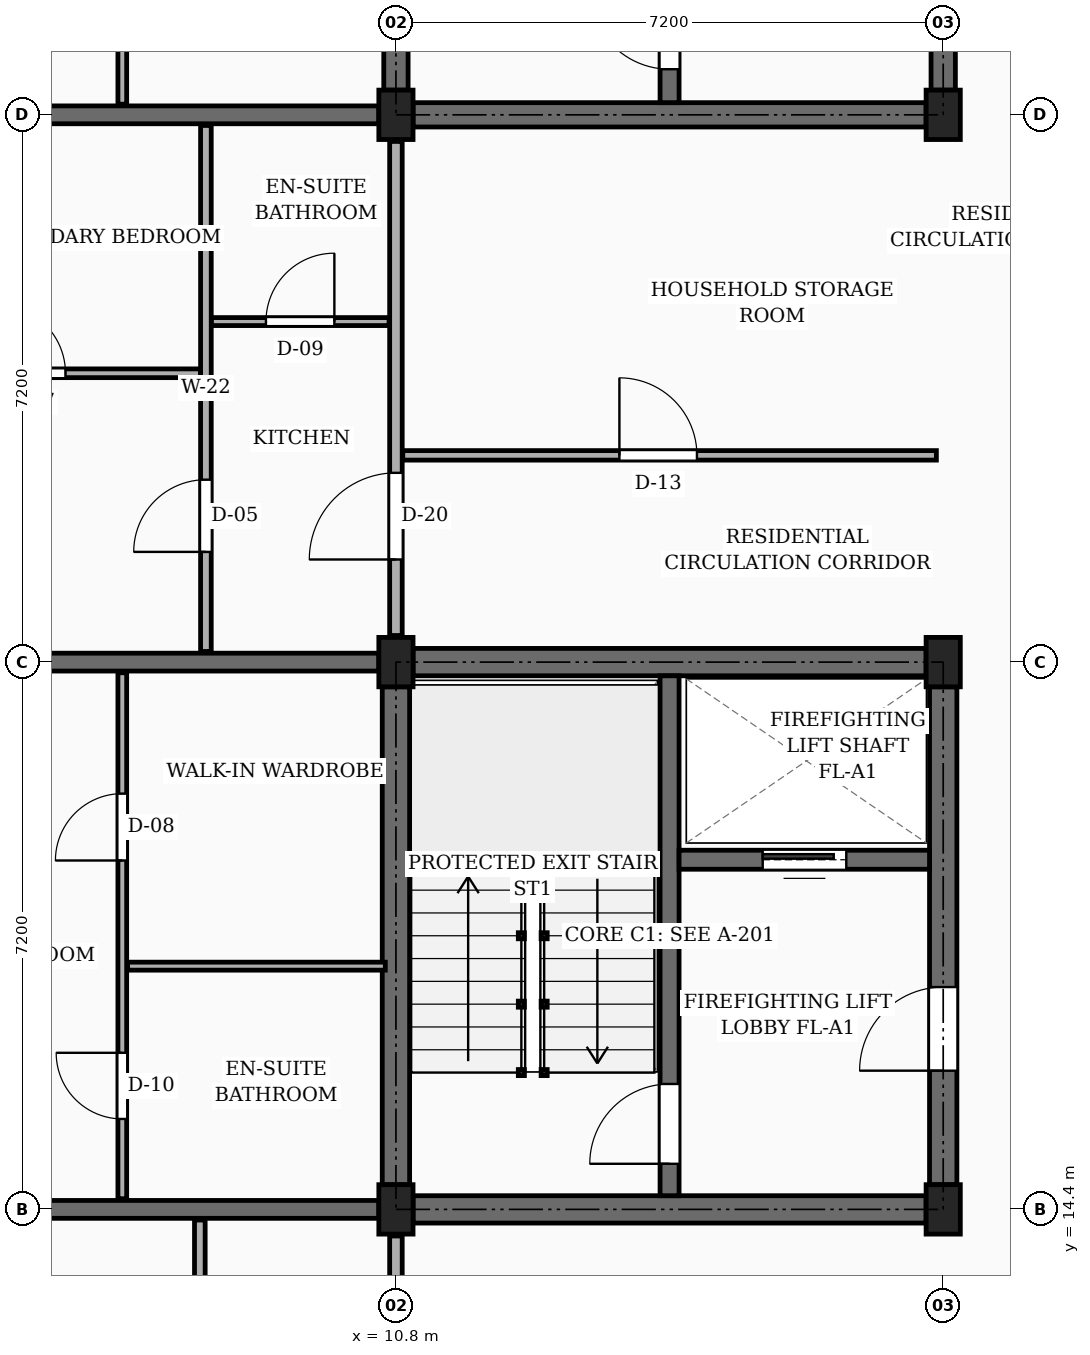
"""IFC4 building model, lengths in metres.
Left out: names, types, materials, properties, quantities, classifications, styles, units other than length and angle.
Written with IfcOpenShell. Run it as: python <this file> out.ifc"""

import sys

from ifc_helpers import new_model, si_unit, direction, frame, frame_2d, origin, origin_2d, place, context, subcontext, project, spatial, rectangle, extrude, element, fill, save


model = new_model("IFC4")
c1 = context("Model", 3, precision=1e-05, world=origin(), true_north=direction((0.0, 1.0)))
c2 = subcontext(c1, "Body", "Model", "MODEL_VIEW")
j1 = project(units=[si_unit("LENGTHUNIT", "METRE"), si_unit("PLANEANGLEUNIT", "RADIAN")], contexts=[c1])
p1 = place(None, origin())
s1 = spatial("IfcSite", under=j1, at=p1, CompositionType="ELEMENT")
p2 = place(p1, origin())
s2 = spatial("IfcBuilding", under=s1, at=p2, CompositionType="ELEMENT")
p3 = place(p2, frame((0.0, 0.0, 20.25)))
s3 = spatial("IfcBuildingStorey", under=s2, at=p3, CompositionType="ELEMENT", Elevation=20.25)
for number, where, z_axis, x_axis in (
    (1, (10.8, 14.4, 0.0), (0.0, 0.0, 1.0), (1.0, 0.0, 0.0)),
    (2, (10.8, 21.6, 0.0), (0.0, 0.0, 1.0), (1.0, 0.0, 0.0)),
    (3, (10.8, 28.8, 0.0), (0.0, 0.0, 1.0), (1.0, 0.0, 0.0)),
    (4, (18.0, 14.4, 0.0), (0.0, 0.0, 1.0), (1.0, 0.0, 0.0)),
    (5, (18.0, 21.6, 0.0), (0.0, 0.0, 1.0), (1.0, 0.0, 0.0)),
    (6, (18.0, 28.8, 0.0), (0.0, 0.0, 1.0), (1.0, 0.0, 0.0)),
):
    element("IfcColumn", number, at=place(p3, frame(where, z_axis=z_axis, x_axis=x_axis)), inside=s3, PredefinedType="COLUMN", context=c2, shape_type="SweptSolid", body=[
        extrude(rectangle(XDim=0.45, YDim=0.65, at=origin_2d()), origin(), (0.0, 0.0, 1.0), 3.15),
    ])
p4 = place(p3, frame((3.875, 14.4, 0.0), z_axis=(0.0, 0.0, 1.0), x_axis=(1.0, 0.0, 0.0)))
e7 = element("IfcWall", 7, at=p4, inside=s3, PredefinedType="SOLIDWALL", context=c2, shape_type="SweptSolid", body=[
    extrude(rectangle(XDim=6.7, YDim=0.235, at=frame_2d((3.35, 0.0))), origin(), (0.0, 0.0, 1.0), 2.17),
])
p5 = place(p4, frame((1.35, 0.0, 0.0)))
e8 = element("IfcOpeningElement", 8, at=p5, cuts=e7, PredefinedType="OPENING", context=c2, shape_type="SweptSolid", body=[
    extrude(rectangle(XDim=0.98, YDim=2.12, at=frame_2d((0.49, 1.06))), frame((0.0, 0.127, 0.0), z_axis=(0.0, -1.0, 0.0), x_axis=(1.0, 0.0, 0.0)), (0.0, 0.0, 1.0), 0.255),
])
p6 = place(p3, frame((3.875, 21.6, 0.0), z_axis=(0.0, 0.0, 1.0), x_axis=(1.0, 0.0, 0.0)))
e9 = element("IfcWall", 9, at=p6, inside=s3, PredefinedType="SOLIDWALL", context=c2, shape_type="SweptSolid", body=[
    extrude(rectangle(XDim=6.7, YDim=0.235, at=frame_2d((3.35, 0.0))), origin(), (0.0, 0.0, 1.0), 2.17),
])
p7 = place(p3, frame((3.875, 28.8, 0.0), z_axis=(0.0, 0.0, 1.0), x_axis=(1.0, 0.0, 0.0)))
e10 = element("IfcWall", 10, at=p7, inside=s3, PredefinedType="SOLIDWALL", context=c2, shape_type="SweptSolid", body=[
    extrude(rectangle(XDim=6.7, YDim=0.235, at=frame_2d((3.35, 0.0))), origin(), (0.0, 0.0, 1.0), 2.17),
])
p8 = place(p7, frame((1.35, 0.0, 0.0)))
e11 = element("IfcOpeningElement", 11, at=p8, cuts=e10, PredefinedType="OPENING", context=c2, shape_type="SweptSolid", body=[
    extrude(rectangle(XDim=0.98, YDim=2.12, at=frame_2d((0.49, 1.06))), frame((0.0, 0.127, 0.0), z_axis=(0.0, -1.0, 0.0), x_axis=(1.0, 0.0, 0.0)), (0.0, 0.0, 1.0), 0.255),
])
p9 = place(p3, frame((10.8, 14.725, 0.0), z_axis=(0.0, 0.0, 1.0), x_axis=(0.0, 1.0, 0.0)))
e12 = element("IfcWall", 12, at=p9, inside=s3, PredefinedType="SHEAR", context=c2, shape_type="SweptSolid", body=[
    extrude(rectangle(XDim=6.55, YDim=0.36, at=frame_2d((3.275, 0.0))), origin(), (0.0, 0.0, 1.0), 2.87),
])
p10 = place(p3, frame((11.025, 21.6, 0.0), z_axis=(0.0, 0.0, 1.0), x_axis=(1.0, 0.0, 0.0)))
e13 = element("IfcWall", 13, at=p10, inside=s3, PredefinedType="SHEAR", context=c2, shape_type="SweptSolid", body=[
    extrude(rectangle(XDim=6.75, YDim=0.36, at=frame_2d((3.375, 0.0))), origin(), (0.0, 0.0, 1.0), 2.87),
])
p11 = place(p3, frame((18.0, 14.725, 0.0), z_axis=(0.0, 0.0, 1.0), x_axis=(0.0, 1.0, 0.0)))
e14 = element("IfcWall", 14, at=p11, inside=s3, PredefinedType="SHEAR", context=c2, shape_type="SweptSolid", body=[
    extrude(rectangle(XDim=6.55, YDim=0.36, at=frame_2d((3.275, 0.0))), origin(), (0.0, 0.0, 1.0), 2.87),
])
p12 = place(p11, frame((1.5, 0.0, 0.0)))
e15 = element("IfcOpeningElement", 15, at=p12, cuts=e14, PredefinedType="OPENING", context=c2, shape_type="SweptSolid", body=[
    extrude(rectangle(XDim=1.1, YDim=2.15, at=frame_2d((0.55, 1.075))), frame((0.0, 0.19, 0.0), z_axis=(0.0, -1.0, 0.0), x_axis=(1.0, 0.0, 0.0)), (0.0, 0.0, 1.0), 0.38),
])
p13 = place(p3, frame((11.025, 14.4, 0.0), z_axis=(0.0, 0.0, 1.0), x_axis=(1.0, 0.0, 0.0)))
e16 = element("IfcWall", 16, at=p13, inside=s3, PredefinedType="SHEAR", context=c2, shape_type="SweptSolid", body=[
    extrude(rectangle(XDim=6.75, YDim=0.36, at=frame_2d((3.375, 0.0))), origin(), (0.0, 0.0, 1.0), 2.87),
])
p14 = place(p3, frame((14.4, 14.58, 0.0), z_axis=(0.0, 0.0, 1.0), x_axis=(0.0, 1.0, 0.0)))
e17 = element("IfcWall", 17, at=p14, inside=s3, PredefinedType="SHEAR", context=c2, shape_type="SweptSolid", body=[
    extrude(rectangle(XDim=6.84, YDim=0.25, at=frame_2d((3.42, 0.0))), origin(), (0.0, 0.0, 1.0), 2.87),
])
p15 = place(p14, frame((0.42, 0.0, 0.0)))
e18 = element("IfcOpeningElement", 18, at=p15, cuts=e17, PredefinedType="OPENING", context=c2, shape_type="SweptSolid", body=[
    extrude(rectangle(XDim=1.05, YDim=2.15, at=frame_2d((0.525, 1.075))), frame((0.0, 0.135, 0.0), z_axis=(0.0, -1.0, 0.0), x_axis=(1.0, 0.0, 0.0)), (0.0, 0.0, 1.0), 0.27),
])
p16 = place(p3, frame((14.525, 19.0, 0.0), z_axis=(0.0, 0.0, 1.0), x_axis=(1.0, 0.0, 0.0)))
e19 = element("IfcWall", 19, at=p16, inside=s3, PredefinedType="SHEAR", context=c2, shape_type="SweptSolid", body=[
    extrude(rectangle(XDim=3.295, YDim=0.25, at=frame_2d((1.647, 0.0))), origin(), (0.0, 0.0, 1.0), 2.87),
])
p17 = place(p16, frame((1.1, 0.0, 0.0)))
e20 = element("IfcOpeningElement", 20, at=p17, cuts=e19, PredefinedType="OPENING", context=c2, shape_type="SweptSolid", body=[
    extrude(rectangle(XDim=1.1, YDim=2.2, at=frame_2d((0.55, 1.1))), frame((0.0, 0.135, 0.0), z_axis=(0.0, -1.0, 0.0), x_axis=(1.0, 0.0, 0.0)), (0.0, 0.0, 1.0), 0.27),
])
p18 = place(p3, frame((10.8, 29.125, 0.0), z_axis=(0.0, 0.0, 1.0), x_axis=(0.0, 1.0, 0.0)))
e21 = element("IfcWall", 21, at=p18, inside=s3, PredefinedType="SHEAR", context=c2, shape_type="SweptSolid", body=[
    extrude(rectangle(XDim=6.55, YDim=0.32, at=frame_2d((3.275, 0.0))), origin(), (0.0, 0.0, 1.0), 2.87),
])
p19 = place(p3, frame((18.0, 29.125, 0.0), z_axis=(0.0, 0.0, 1.0), x_axis=(0.0, 1.0, 0.0)))
e22 = element("IfcWall", 22, at=p19, inside=s3, PredefinedType="SHEAR", context=c2, shape_type="SweptSolid", body=[
    extrude(rectangle(XDim=6.55, YDim=0.32, at=frame_2d((3.275, 0.0))), origin(), (0.0, 0.0, 1.0), 2.87),
])
p20 = place(p19, frame((1.5, 0.0, 0.0)))
e23 = element("IfcOpeningElement", 23, at=p20, cuts=e22, PredefinedType="OPENING", context=c2, shape_type="SweptSolid", body=[
    extrude(rectangle(XDim=1.1, YDim=2.15, at=frame_2d((0.55, 1.075))), frame((0.0, 0.17, 0.0), z_axis=(0.0, -1.0, 0.0), x_axis=(1.0, 0.0, 0.0)), (0.0, 0.0, 1.0), 0.34),
])
p21 = place(p3, frame((11.025, 28.8, 0.0), z_axis=(0.0, 0.0, 1.0), x_axis=(1.0, 0.0, 0.0)))
e24 = element("IfcWall", 24, at=p21, inside=s3, PredefinedType="SHEAR", context=c2, shape_type="SweptSolid", body=[
    extrude(rectangle(XDim=6.75, YDim=0.32, at=frame_2d((3.375, 0.0))), origin(), (0.0, 0.0, 1.0), 2.87),
])
p22 = place(p3, frame((14.4, 28.96, 0.0), z_axis=(0.0, 0.0, 1.0), x_axis=(0.0, 1.0, 0.0)))
e25 = element("IfcWall", 25, at=p22, inside=s3, PredefinedType="SHEAR", context=c2, shape_type="SweptSolid", body=[
    extrude(rectangle(XDim=6.88, YDim=0.25, at=frame_2d((3.44, 0.0))), origin(), (0.0, 0.0, 1.0), 2.87),
])
p23 = place(p22, frame((0.44, 0.0, 0.0)))
e26 = element("IfcOpeningElement", 26, at=p23, cuts=e25, PredefinedType="OPENING", context=c2, shape_type="SweptSolid", body=[
    extrude(rectangle(XDim=1.05, YDim=2.15, at=frame_2d((0.525, 1.075))), frame((0.0, 0.135, 0.0), z_axis=(0.0, -1.0, 0.0), x_axis=(1.0, 0.0, 0.0)), (0.0, 0.0, 1.0), 0.27),
])
p24 = place(p3, frame((10.8, 7.55, 0.0), z_axis=(0.0, 0.0, 1.0), x_axis=(0.0, 1.0, 0.0)))
e27 = element("IfcWall", 27, at=p24, inside=s3, PredefinedType="PARTITIONING", context=c2, shape_type="SweptSolid", body=[
    extrude(rectangle(XDim=6.5, YDim=0.165, at=frame_2d((3.25, 0.0))), origin(), (0.0, 0.0, 1.0), 2.305),
])
p25 = place(p24, frame((1.0, 0.0, 0.0)))
e28 = element("IfcOpeningElement", 28, at=p25, cuts=e27, PredefinedType="OPENING", context=c2, shape_type="SweptSolid", body=[
    extrude(rectangle(XDim=0.94, YDim=2.12, at=frame_2d((0.47, 1.06))), frame((0.0, 0.093, 0.0), z_axis=(0.0, -1.0, 0.0), x_axis=(1.0, 0.0, 0.0)), (0.0, 0.0, 1.0), 0.185),
])
p26 = place(p3, frame((10.8, 21.95, 0.0), z_axis=(0.0, 0.0, 1.0), x_axis=(0.0, 1.0, 0.0)))
e29 = element("IfcWall", 29, at=p26, inside=s3, PredefinedType="PARTITIONING", context=c2, shape_type="SweptSolid", body=[
    extrude(rectangle(XDim=6.5, YDim=0.165, at=frame_2d((3.25, 0.0))), origin(), (0.0, 0.0, 1.0), 2.305),
])
p27 = place(p26, frame((1.0, 0.0, 0.0)))
e30 = element("IfcOpeningElement", 30, at=p27, cuts=e29, PredefinedType="OPENING", context=c2, shape_type="SweptSolid", body=[
    extrude(rectangle(XDim=1.14, YDim=2.18, at=frame_2d((0.57, 1.09))), frame((0.0, 0.093, 0.0), z_axis=(0.0, -1.0, 0.0), x_axis=(1.0, 0.0, 0.0)), (0.0, 0.0, 1.0), 0.185),
])
p28 = place(p3, frame((8.22, 7.375, 0.0), z_axis=(0.0, 0.0, 1.0), x_axis=(0.0, 1.0, 0.0)))
e31 = element("IfcWall", 31, at=p28, inside=s3, PredefinedType="PARTITIONING", context=c2, shape_type="SweptSolid", body=[
    extrude(rectangle(XDim=6.885, YDim=0.14, at=frame_2d((3.442, 0.0))), origin(), (0.0, 0.0, 1.0), 2.305),
])
p29 = place(p28, frame((1.275, 0.0, 0.0)))
e32 = element("IfcOpeningElement", 32, at=p29, cuts=e31, PredefinedType="OPENING", context=c2, shape_type="SweptSolid", body=[
    extrude(rectangle(XDim=0.95, YDim=2.1, at=frame_2d((0.475, 1.05))), frame((0.0, 0.08, 0.0), z_axis=(0.0, -1.0, 0.0), x_axis=(1.0, 0.0, 0.0)), (0.0, 0.0, 1.0), 0.16),
])
p30 = place(p3, frame((7.2, 14.54, 0.0), z_axis=(0.0, 0.0, 1.0), x_axis=(0.0, 1.0, 0.0)))
e33 = element("IfcWall", 33, at=p30, inside=s3, PredefinedType="PARTITIONING", context=c2, shape_type="SweptSolid", body=[
    extrude(rectangle(XDim=6.92, YDim=0.115, at=frame_2d((3.46, 0.0))), origin(), (0.0, 0.0, 1.0), 2.305),
])
p31 = place(p30, frame((1.05, 0.0, 0.0)))
e34 = element("IfcOpeningElement", 34, at=p31, cuts=e33, PredefinedType="OPENING", context=c2, shape_type="SweptSolid", body=[
    extrude(rectangle(XDim=0.87, YDim=2.05, at=frame_2d((0.435, 1.025))), frame((0.0, 0.067, 0.0), z_axis=(0.0, -1.0, 0.0), x_axis=(1.0, 0.0, 0.0)), (0.0, 0.0, 1.0), 0.135),
])
p32 = place(p30, frame((4.45, 0.0, 0.0)))
e35 = element("IfcOpeningElement", 35, at=p32, cuts=e33, PredefinedType="OPENING", context=c2, shape_type="SweptSolid", body=[
    extrude(rectangle(XDim=0.88, YDim=2.08, at=frame_2d((0.44, 1.04))), frame((0.0, 0.067, 0.0), z_axis=(0.0, -1.0, 0.0), x_axis=(1.0, 0.0, 0.0)), (0.0, 0.0, 1.0), 0.135),
])
p33 = place(p3, frame((7.27, 17.6, 0.0), z_axis=(0.0, 0.0, 1.0), x_axis=(1.0, 0.0, 0.0)))
e36 = element("IfcWall", 36, at=p33, inside=s3, PredefinedType="PARTITIONING", context=c2, shape_type="SweptSolid", body=[
    extrude(rectangle(XDim=3.39, YDim=0.105, at=frame_2d((1.695, 0.0))), origin(), (0.0, 0.0, 1.0), 2.305),
])
p34 = place(p3, frame((10.89, 24.32, 0.0), z_axis=(0.0, 0.0, 1.0), x_axis=(1.0, 0.0, 0.0)))
e37 = element("IfcWall", 37, at=p34, inside=s3, PredefinedType="PARTITIONING", context=c2, shape_type="SweptSolid", body=[
    extrude(rectangle(XDim=7.02, YDim=0.125, at=frame_2d((3.51, 0.0))), origin(), (0.0, 0.0, 1.0), 2.305),
])
p35 = place(p34, frame((2.85, 0.0, 0.0)))
e38 = element("IfcOpeningElement", 38, at=p35, cuts=e37, PredefinedType="OPENING", context=c2, shape_type="SweptSolid", body=[
    extrude(rectangle(XDim=1.02, YDim=2.15, at=frame_2d((0.51, 1.075))), frame((0.0, 0.073, 0.0), z_axis=(0.0, -1.0, 0.0), x_axis=(1.0, 0.0, 0.0)), (0.0, 0.0, 1.0), 0.145),
])
p36 = place(p3, frame((3.775, 25.4, 0.0), z_axis=(0.0, 0.0, 1.0), x_axis=(1.0, 0.0, 0.0)))
e39 = element("IfcWall", 39, at=p36, inside=s3, PredefinedType="PARTITIONING", context=c2, shape_type="SweptSolid", body=[
    extrude(rectangle(XDim=4.455, YDim=0.115, at=frame_2d((2.228, 0.0))), origin(), (0.0, 0.0, 1.0), 2.305),
])
p37 = place(p36, frame((1.778, 0.0, 0.0)))
e40 = element("IfcOpeningElement", 40, at=p37, cuts=e39, PredefinedType="OPENING", context=c2, shape_type="SweptSolid", body=[
    extrude(rectangle(XDim=0.9, YDim=2.1, at=frame_2d((0.45, 1.05))), frame((0.0, 0.067, 0.0), z_axis=(0.0, -1.0, 0.0), x_axis=(1.0, 0.0, 0.0)), (0.0, 0.0, 1.0), 0.135),
])
p38 = place(p3, frame((8.37, 26.08, 0.0), z_axis=(0.0, 0.0, 1.0), x_axis=(1.0, 0.0, 0.0)))
e41 = element("IfcWall", 41, at=p38, inside=s3, PredefinedType="PARTITIONING", context=c2, shape_type="SweptSolid", body=[
    extrude(rectangle(XDim=2.34, YDim=0.105, at=frame_2d((1.17, 0.0))), origin(), (0.0, 0.0, 1.0), 2.305),
])
p39 = place(p38, frame((0.72, 0.0, 0.0)))
e42 = element("IfcOpeningElement", 42, at=p39, cuts=e41, PredefinedType="OPENING", context=c2, shape_type="SweptSolid", body=[
    extrude(rectangle(XDim=0.9, YDim=2.05, at=frame_2d((0.45, 1.025))), frame((0.0, 0.062, 0.0), z_axis=(0.0, -1.0, 0.0), x_axis=(1.0, 0.0, 0.0)), (0.0, 0.0, 1.0), 0.125),
])
p40 = place(p3, frame((8.3, 21.74, 0.0), z_axis=(0.0, 0.0, 1.0), x_axis=(0.0, 1.0, 0.0)))
e43 = element("IfcWall", 43, at=p40, inside=s3, PredefinedType="PARTITIONING", context=c2, shape_type="SweptSolid", body=[
    extrude(rectangle(XDim=6.92, YDim=0.14, at=frame_2d((3.46, 0.0))), origin(), (0.0, 0.0, 1.0), 2.305),
])
p41 = place(p40, frame((1.31, 0.0, 0.0)))
e44 = element("IfcOpeningElement", 44, at=p41, cuts=e43, PredefinedType="OPENING", context=c2, shape_type="SweptSolid", body=[
    extrude(rectangle(XDim=0.95, YDim=2.1, at=frame_2d((0.475, 1.05))), frame((0.0, 0.08, 0.0), z_axis=(0.0, -1.0, 0.0), x_axis=(1.0, 0.0, 0.0)), (0.0, 0.0, 1.0), 0.16),
])
p42 = place(p3, frame((7.2, 28.94, 0.0), z_axis=(0.0, 0.0, 1.0), x_axis=(0.0, 1.0, 0.0)))
e45 = element("IfcWall", 45, at=p42, inside=s3, PredefinedType="PARTITIONING", context=c2, shape_type="SweptSolid", body=[
    extrude(rectangle(XDim=6.92, YDim=0.115, at=frame_2d((3.46, 0.0))), origin(), (0.0, 0.0, 1.0), 2.305),
])
p43 = place(p42, frame((1.05, 0.0, 0.0)))
e46 = element("IfcOpeningElement", 46, at=p43, cuts=e45, PredefinedType="OPENING", context=c2, shape_type="SweptSolid", body=[
    extrude(rectangle(XDim=0.87, YDim=2.05, at=frame_2d((0.435, 1.025))), frame((0.0, 0.067, 0.0), z_axis=(0.0, -1.0, 0.0), x_axis=(1.0, 0.0, 0.0)), (0.0, 0.0, 1.0), 0.135),
])
p44 = place(p42, frame((4.45, 0.0, 0.0)))
e47 = element("IfcOpeningElement", 47, at=p44, cuts=e45, PredefinedType="OPENING", context=c2, shape_type="SweptSolid", body=[
    extrude(rectangle(XDim=0.88, YDim=2.08, at=frame_2d((0.44, 1.04))), frame((0.0, 0.067, 0.0), z_axis=(0.0, -1.0, 0.0), x_axis=(1.0, 0.0, 0.0)), (0.0, 0.0, 1.0), 0.135),
])
p45 = place(p12, frame((1.1, 0.0, 0.0), z_axis=(0.0, 0.0, 1.0), x_axis=(-1.0, 0.0, 0.0)))
e48 = element("IfcDoor", 48, at=p45, inside=s3, OperationType="SINGLE_SWING_LEFT", PredefinedType="DOOR", context=c2, shape_type="SweptSolid", body=[
    extrude(rectangle(XDim=1.1, YDim=2.15, at=frame_2d((0.55, 1.075))), frame((0.0, 0.025, 0.0), z_axis=(0.0, -1.0, 0.0), x_axis=(1.0, 0.0, 0.0)), (0.0, 0.0, 1.0), 0.05),
])
fill(e15, e48)
p46 = place(p15, origin())
e49 = element("IfcDoor", 49, at=p46, inside=s3, OperationType="SINGLE_SWING_LEFT", PredefinedType="DOOR", context=c2, shape_type="SweptSolid", body=[
    extrude(rectangle(XDim=1.05, YDim=2.15, at=frame_2d((0.525, 1.075))), frame((0.0, 0.025, 0.0), z_axis=(0.0, -1.0, 0.0), x_axis=(1.0, 0.0, 0.0)), (0.0, 0.0, 1.0), 0.05),
])
fill(e18, e49)
p47 = place(p17, origin())
e50 = element("IfcDoor", 50, at=p47, inside=s3, OperationType="SLIDING_TO_LEFT", PredefinedType="DOOR", context=c2, shape_type="SweptSolid", body=[
    extrude(rectangle(XDim=1.1, YDim=2.2, at=frame_2d((0.55, 1.1))), frame((0.0, 0.025, 0.0), z_axis=(0.0, -1.0, 0.0), x_axis=(1.0, 0.0, 0.0)), (0.0, 0.0, 1.0), 0.05),
])
fill(e20, e50)
p48 = place(p23, origin())
e51 = element("IfcDoor", 51, at=p48, inside=s3, OperationType="SINGLE_SWING_RIGHT", PredefinedType="DOOR", context=c2, shape_type="SweptSolid", body=[
    extrude(rectangle(XDim=1.05, YDim=2.15, at=frame_2d((0.525, 1.075))), frame((0.0, 0.025, 0.0), z_axis=(0.0, -1.0, 0.0), x_axis=(1.0, 0.0, 0.0)), (0.0, 0.0, 1.0), 0.05),
])
fill(e26, e51)
p49 = place(p27, origin())
e52 = element("IfcDoor", 52, at=p49, inside=s3, OperationType="SINGLE_SWING_LEFT", PredefinedType="DOOR", context=c2, shape_type="SweptSolid", body=[
    extrude(rectangle(XDim=1.14, YDim=2.18, at=frame_2d((0.57, 1.09))), frame((0.0, 0.025, 0.0), z_axis=(0.0, -1.0, 0.0), x_axis=(1.0, 0.0, 0.0)), (0.0, 0.0, 1.0), 0.05),
])
fill(e30, e52)
p50 = place(p31, origin())
e53 = element("IfcDoor", 53, at=p50, inside=s3, OperationType="SINGLE_SWING_RIGHT", PredefinedType="DOOR", context=c2, shape_type="SweptSolid", body=[
    extrude(rectangle(XDim=0.87, YDim=2.05, at=frame_2d((0.435, 1.025))), frame((0.0, 0.025, 0.0), z_axis=(0.0, -1.0, 0.0), x_axis=(1.0, 0.0, 0.0)), (0.0, 0.0, 1.0), 0.05),
])
fill(e34, e53)
p51 = place(p32, origin())
e54 = element("IfcDoor", 54, at=p51, inside=s3, OperationType="SINGLE_SWING_LEFT", PredefinedType="DOOR", context=c2, shape_type="SweptSolid", body=[
    extrude(rectangle(XDim=0.88, YDim=2.08, at=frame_2d((0.44, 1.04))), frame((0.0, 0.025, 0.0), z_axis=(0.0, -1.0, 0.0), x_axis=(1.0, 0.0, 0.0)), (0.0, 0.0, 1.0), 0.05),
])
fill(e35, e54)
p52 = place(p35, origin())
e55 = element("IfcDoor", 55, at=p52, inside=s3, OperationType="SINGLE_SWING_LEFT", PredefinedType="DOOR", context=c2, shape_type="SweptSolid", body=[
    extrude(rectangle(XDim=1.02, YDim=2.15, at=frame_2d((0.51, 1.075))), frame((0.0, 0.025, 0.0), z_axis=(0.0, -1.0, 0.0), x_axis=(1.0, 0.0, 0.0)), (0.0, 0.0, 1.0), 0.05),
])
fill(e38, e55)
p53 = place(p37, origin())
e56 = element("IfcDoor", 56, at=p53, inside=s3, OperationType="SINGLE_SWING_LEFT", PredefinedType="DOOR", context=c2, shape_type="SweptSolid", body=[
    extrude(rectangle(XDim=0.9, YDim=2.1, at=frame_2d((0.45, 1.05))), frame((0.0, 0.025, 0.0), z_axis=(0.0, -1.0, 0.0), x_axis=(1.0, 0.0, 0.0)), (0.0, 0.0, 1.0), 0.05),
])
fill(e40, e56)
p54 = place(p39, origin())
e57 = element("IfcDoor", 57, at=p54, inside=s3, OperationType="SINGLE_SWING_RIGHT", PredefinedType="DOOR", context=c2, shape_type="SweptSolid", body=[
    extrude(rectangle(XDim=0.9, YDim=2.05, at=frame_2d((0.45, 1.025))), frame((0.0, 0.025, 0.0), z_axis=(0.0, -1.0, 0.0), x_axis=(1.0, 0.0, 0.0)), (0.0, 0.0, 1.0), 0.05),
])
fill(e42, e57)
p55 = place(p41, origin())
e58 = element("IfcDoor", 58, at=p55, inside=s3, OperationType="SINGLE_SWING_LEFT", PredefinedType="DOOR", context=c2, shape_type="SweptSolid", body=[
    extrude(rectangle(XDim=0.95, YDim=2.1, at=frame_2d((0.475, 1.05))), frame((0.0, 0.025, 0.0), z_axis=(0.0, -1.0, 0.0), x_axis=(1.0, 0.0, 0.0)), (0.0, 0.0, 1.0), 0.05),
])
fill(e44, e58)
save(model, sys.argv[1])
